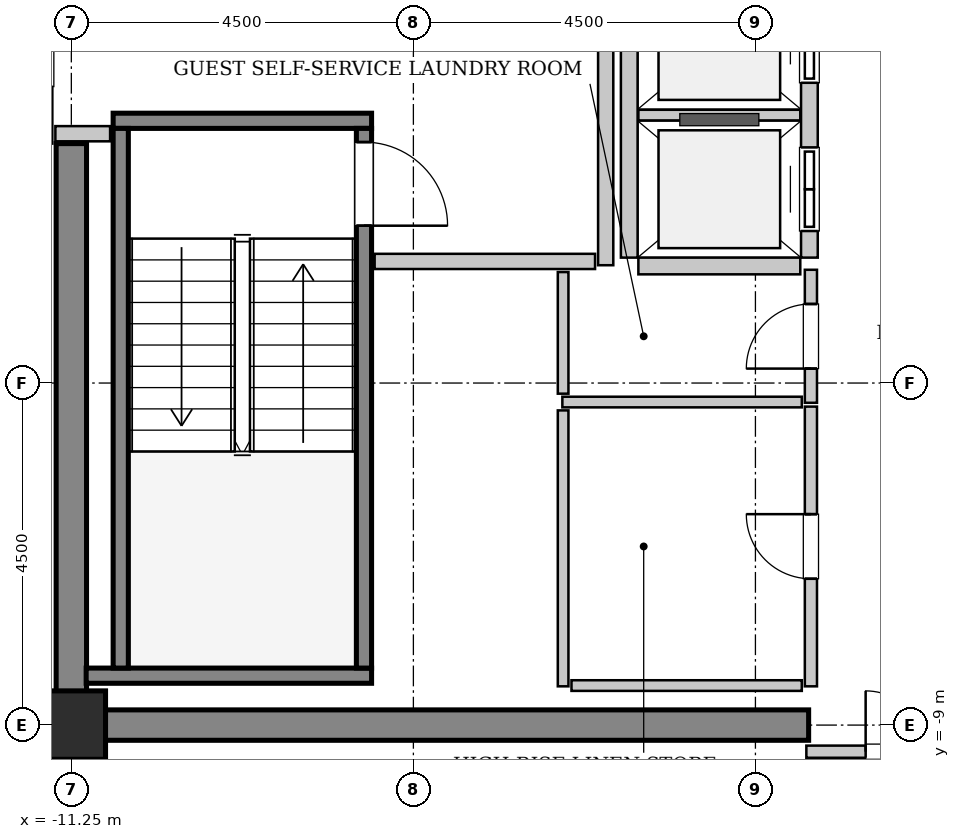
"""IFC4 building model, lengths in metres.
Left out: names, types, materials, properties, quantities, classifications, styles, units other than length and angle.
Written with IfcOpenShell. Run it as: python <this file> out.ifc"""

import sys

from ifc_helpers import new_model, si_unit, direction, frame, frame_2d, origin, origin_2d, place, context, subcontext, project, spatial, rectangle, extrude, source, transform, mapped, element, fill, save


model = new_model("IFC4")
c1 = context("Model", 3, precision=1e-05, world=origin(), true_north=direction((0.0, 1.0)))
c2 = subcontext(c1, "Body", "Model", "MODEL_VIEW")
j1 = project(units=[si_unit("LENGTHUNIT", "METRE"), si_unit("PLANEANGLEUNIT", "RADIAN")], contexts=[c1])
p1 = place(None, origin())
s1 = spatial("IfcSite", under=j1, at=p1, CompositionType="ELEMENT")
p2 = place(p1, origin())
s2 = spatial("IfcBuilding", under=s1, at=p2, CompositionType="ELEMENT")
p3 = place(p2, frame((0.0, 0.0, 333.8)))
s3 = spatial("IfcBuildingStorey", under=s2, at=p3, CompositionType="ELEMENT", Elevation=333.8)
m1 = source(origin(), c2, "Body", "SweptSolid", [
    extrude(rectangle(XDim=9.9, YDim=0.4, at=frame_2d((4.95, 0.0))), origin(), (0.0, 0.0, 1.0), 3.8),
])
p4 = place(p3, frame((-11.45, -9.0, 0.0), z_axis=(0.0, 0.0, 1.0), x_axis=(1.0, 0.0, 0.0)))
e1 = element("IfcWall", 1, at=p4, inside=s3, PredefinedType="SHEAR", context=c2, shape_type="MappedRepresentation", body=[
    mapped(m1, transform((0.0, 0.0, 0.0), x_axis=(1.0, 0.0, 0.0), y_axis=(0.0, 1.0, 0.0), z_axis=(0.0, 0.0, 1.0), scale=1.0)),
])
m2 = source(origin(), c2, "Body", "SweptSolid", [
    extrude(rectangle(XDim=7.45, YDim=0.4, at=frame_2d((3.725, 0.0))), origin(), (0.0, 0.0, 1.0), 3.8),
])
p5 = place(p3, frame((-11.25, -8.8, 0.0), z_axis=(0.0, 0.0, 1.0), x_axis=(0.0, 1.0, 0.0)))
e2 = element("IfcWall", 2, at=p5, inside=s3, PredefinedType="SHEAR", context=c2, shape_type="MappedRepresentation", body=[
    mapped(m2, transform((0.0, 0.0, 0.0), x_axis=(1.0, 0.0, 0.0), y_axis=(0.0, 1.0, 0.0), z_axis=(0.0, 0.0, 1.0), scale=1.0)),
])
m3 = source(origin(), c2, "Body", "SweptSolid", [
    extrude(rectangle(XDim=0.9, YDim=0.9, at=origin_2d()), origin(), (0.0, 0.0, 1.0), 3.8),
])
p6 = place(p3, frame((-11.25, -9.0, 0.0), z_axis=(0.0, 0.0, 1.0), x_axis=(1.0, 0.0, 0.0)))
e3 = element("IfcColumn", 3, at=p6, inside=s3, PredefinedType="COLUMN", context=c2, shape_type="MappedRepresentation", body=[
    mapped(m3, transform((0.0, 0.0, 0.0), x_axis=(1.0, 0.0, 0.0), y_axis=(0.0, 1.0, 0.0), z_axis=(0.0, 0.0, 1.0), scale=1.0)),
])
m4 = source(origin(), c2, "Body", "SweptSolid", [
    extrude(rectangle(XDim=3.4, YDim=0.2, at=frame_2d((1.7, 0.0))), origin(), (0.0, 0.0, 1.0), 3.8),
])
p7 = place(p3, frame((-10.7, -1.05, 0.0), z_axis=(0.0, 0.0, 1.0), x_axis=(1.0, 0.0, 0.0)))
e4 = element("IfcWall", 4, at=p7, inside=s3, PredefinedType="SOLIDWALL", context=c2, shape_type="MappedRepresentation", body=[
    mapped(m4, transform((0.0, 0.0, 0.0), x_axis=(1.0, 0.0, 0.0), y_axis=(0.0, 1.0, 0.0), z_axis=(0.0, 0.0, 1.0), scale=1.0)),
])
m5 = source(origin(), c2, "Body", "SweptSolid", [
    extrude(rectangle(XDim=3.755, YDim=0.2, at=frame_2d((1.877, 0.0))), origin(), (0.0, 0.0, 1.0), 3.8),
])
p8 = place(p3, frame((-11.055, -8.35, 0.0), z_axis=(0.0, 0.0, 1.0), x_axis=(1.0, 0.0, 0.0)))
e5 = element("IfcWall", 5, at=p8, inside=s3, PredefinedType="SOLIDWALL", context=c2, shape_type="MappedRepresentation", body=[
    mapped(m5, transform((0.0, 0.0, 0.0), x_axis=(1.0, 0.0, 0.0), y_axis=(0.0, 1.0, 0.0), z_axis=(0.0, 0.0, 1.0), scale=1.0)),
])
m6 = source(origin(), c2, "Body", "SweptSolid", [
    extrude(rectangle(XDim=7.1, YDim=0.2, at=frame_2d((3.55, 0.0))), origin(), (0.0, 0.0, 1.0), 3.8),
])
p9 = place(p3, frame((-10.6, -1.15, 0.0), z_axis=(0.0, 0.0, 1.0), x_axis=(0.0, -1.0, 0.0)))
e6 = element("IfcWall", 6, at=p9, inside=s3, PredefinedType="SOLIDWALL", context=c2, shape_type="MappedRepresentation", body=[
    mapped(m6, transform((0.0, 0.0, 0.0), x_axis=(1.0, 0.0, 0.0), y_axis=(0.0, 1.0, 0.0), z_axis=(0.0, 0.0, 1.0), scale=1.0)),
])
p10 = place(p3, frame((-7.4, -1.15, 0.0), z_axis=(0.0, 0.0, 1.0), x_axis=(0.0, -1.0, 0.0)))
e7 = element("IfcWall", 7, at=p10, inside=s3, PredefinedType="SOLIDWALL", context=c2, shape_type="MappedRepresentation", body=[
    mapped(m6, transform((0.0, 0.0, 0.0), x_axis=(1.0, 0.0, 0.0), y_axis=(0.0, 1.0, 0.0), z_axis=(0.0, 0.0, 1.0), scale=1.0)),
])
p11 = place(p10, frame((0.18, 0.0, 0.0)))
e8 = element("IfcOpeningElement", 8, at=p11, cuts=e7, PredefinedType="OPENING", context=c2, shape_type="SweptSolid", body=[
    extrude(rectangle(XDim=1.1, YDim=2.15, at=frame_2d((0.55, 1.075))), frame((0.0, 0.11, 0.0), z_axis=(0.0, -1.0, 0.0), x_axis=(1.0, 0.0, 0.0)), (0.0, 0.0, 1.0), 0.22),
])
m7 = source(origin(), c2, "Body", "SweptSolid", [
    extrude(rectangle(XDim=5.7, YDim=0.22, at=frame_2d((2.85, 0.0))), origin(), (0.0, 0.0, 1.0), 3.535),
])
p12 = place(p3, frame((-1.54, -2.85, 0.0), z_axis=(0.0, 0.0, 1.0), x_axis=(0.0, 1.0, 0.0)))
e9 = element("IfcWall", 9, at=p12, inside=s3, PredefinedType="SOLIDWALL", context=c2, shape_type="MappedRepresentation", body=[
    mapped(m7, transform((0.0, 0.0, 0.0), x_axis=(1.0, 0.0, 0.0), y_axis=(0.0, 1.0, 0.0), z_axis=(0.0, 0.0, 1.0), scale=1.0)),
])
p13 = place(p12, frame((0.35, 0.0, 0.0)))
e10 = element("IfcOpeningElement", 10, at=p13, cuts=e9, PredefinedType="OPENING", context=c2, shape_type="SweptSolid", body=[
    extrude(rectangle(XDim=1.1, YDim=2.2, at=frame_2d((0.55, 1.1))), frame((0.0, 0.12, 0.0), z_axis=(0.0, -1.0, 0.0), x_axis=(1.0, 0.0, 0.0)), (0.0, 0.0, 1.0), 0.24),
])
p14 = place(p12, frame((2.3, 0.0, 0.0)))
e11 = element("IfcOpeningElement", 11, at=p14, cuts=e9, PredefinedType="OPENING", context=c2, shape_type="SweptSolid", body=[
    extrude(rectangle(XDim=1.1, YDim=2.2, at=frame_2d((0.55, 1.1))), frame((0.0, 0.12, 0.0), z_axis=(0.0, -1.0, 0.0), x_axis=(1.0, 0.0, 0.0)), (0.0, 0.0, 1.0), 0.24),
])
p15 = place(p12, frame((4.25, 0.0, 0.0)))
e12 = element("IfcOpeningElement", 12, at=p15, cuts=e9, PredefinedType="OPENING", context=c2, shape_type="SweptSolid", body=[
    extrude(rectangle(XDim=1.1, YDim=2.2, at=frame_2d((0.55, 1.1))), frame((0.0, 0.12, 0.0), z_axis=(0.0, -1.0, 0.0), x_axis=(1.0, 0.0, 0.0)), (0.0, 0.0, 1.0), 0.24),
])
p16 = place(p3, frame((-3.91, 2.85, 0.0), z_axis=(0.0, 0.0, 1.0), x_axis=(0.0, -1.0, 0.0)))
e13 = element("IfcWall", 13, at=p16, inside=s3, PredefinedType="SOLIDWALL", context=c2, shape_type="MappedRepresentation", body=[
    mapped(m7, transform((0.0, 0.0, 0.0), x_axis=(1.0, 0.0, 0.0), y_axis=(0.0, 1.0, 0.0), z_axis=(0.0, 0.0, 1.0), scale=1.0)),
])
m8 = source(origin(), c2, "Body", "SweptSolid", [
    extrude(rectangle(XDim=2.13, YDim=0.22, at=frame_2d((1.065, 0.0))), origin(), (0.0, 0.0, 1.0), 3.535),
])
p17 = place(p3, frame((-3.79, -2.96, 0.0), z_axis=(0.0, 0.0, 1.0), x_axis=(1.0, 0.0, 0.0)))
e14 = element("IfcWall", 14, at=p17, inside=s3, PredefinedType="SOLIDWALL", context=c2, shape_type="MappedRepresentation", body=[
    mapped(m8, transform((0.0, 0.0, 0.0), x_axis=(1.0, 0.0, 0.0), y_axis=(0.0, 1.0, 0.0), z_axis=(0.0, 0.0, 1.0), scale=1.0)),
])
m9 = source(origin(), c2, "Body", "SweptSolid", [
    extrude(rectangle(XDim=2.13, YDim=0.14, at=frame_2d((1.065, 0.0))), origin(), (0.0, 0.0, 1.0), 3.535),
])
p18 = place(p3, frame((-3.79, -0.975, 0.0), z_axis=(0.0, 0.0, 1.0), x_axis=(1.0, 0.0, 0.0)))
e15 = element("IfcWall", 15, at=p18, inside=s3, PredefinedType="PARTITIONING", context=c2, shape_type="MappedRepresentation", body=[
    mapped(m9, transform((0.0, 0.0, 0.0), x_axis=(1.0, 0.0, 0.0), y_axis=(0.0, 1.0, 0.0), z_axis=(0.0, 0.0, 1.0), scale=1.0)),
])
m10 = source(origin(), c2, "Body", "SweptSolid", [
    extrude(rectangle(XDim=5.9, YDim=0.2, at=frame_2d((2.95, 0.0))), origin(), (0.0, 0.0, 1.0), 3.535),
])
p19 = place(p3, frame((-4.22, -2.95, 0.0), z_axis=(0.0, 0.0, 1.0), x_axis=(0.0, 1.0, 0.0)))
e16 = element("IfcWall", 16, at=p19, inside=s3, PredefinedType="PARTITIONING", context=c2, shape_type="MappedRepresentation", body=[
    mapped(m10, transform((0.0, 0.0, 0.0), x_axis=(1.0, 0.0, 0.0), y_axis=(0.0, 1.0, 0.0), z_axis=(0.0, 0.0, 1.0), scale=1.0)),
])
m11 = source(origin(), c2, "Body", "SweptSolid", [
    extrude(rectangle(XDim=2.9, YDim=0.2, at=frame_2d((1.45, 0.0))), origin(), (0.0, 0.0, 1.0), 3.535),
])
p20 = place(p3, frame((-7.26, -2.9, 0.0), z_axis=(0.0, 0.0, 1.0), x_axis=(1.0, 0.0, 0.0)))
e17 = element("IfcWall", 17, at=p20, inside=s3, PredefinedType="PARTITIONING", context=c2, shape_type="MappedRepresentation", body=[
    mapped(m11, transform((0.0, 0.0, 0.0), x_axis=(1.0, 0.0, 0.0), y_axis=(0.0, 1.0, 0.0), z_axis=(0.0, 0.0, 1.0), scale=1.0)),
])
m12 = source(origin(), c2, "Body", "SweptSolid", [
    extrude(rectangle(XDim=0.72, YDim=0.2, at=frame_2d((0.36, 0.0))), origin(), (0.0, 0.0, 1.0), 3.535),
])
p21 = place(p3, frame((-11.46, -1.22, 0.0), z_axis=(0.0, 0.0, 1.0), x_axis=(1.0, 0.0, 0.0)))
e18 = element("IfcWall", 18, at=p21, inside=s3, PredefinedType="PARTITIONING", context=c2, shape_type="MappedRepresentation", body=[
    mapped(m12, transform((0.0, 0.0, 0.0), x_axis=(1.0, 0.0, 0.0), y_axis=(0.0, 1.0, 0.0), z_axis=(0.0, 0.0, 1.0), scale=1.0)),
])
m13 = source(origin(), c2, "Body", "SweptSolid", [
    extrude(rectangle(XDim=3.16, YDim=0.16, at=frame_2d((1.58, 0.0))), origin(), (0.0, 0.0, 1.0), 2.625),
])
p22 = place(p3, frame((-1.58, -9.35, 0.0), z_axis=(0.0, 0.0, 1.0), x_axis=(1.0, 0.0, 0.0)))
e19 = element("IfcWall", 19, at=p22, inside=s3, PredefinedType="PARTITIONING", context=c2, shape_type="MappedRepresentation", body=[
    mapped(m13, transform((0.0, 0.0, 0.0), x_axis=(1.0, 0.0, 0.0), y_axis=(0.0, 1.0, 0.0), z_axis=(0.0, 0.0, 1.0), scale=1.0)),
])
p23 = place(p22, frame((0.78, 0.0, 0.0)))
e20 = element("IfcOpeningElement", 20, at=p23, cuts=e19, PredefinedType="OPENING", context=c2, shape_type="SweptSolid", body=[
    extrude(rectangle(XDim=1.6, YDim=2.3, at=frame_2d((0.8, 1.15))), frame((0.0, 0.09, 0.0), z_axis=(0.0, -1.0, 0.0), x_axis=(1.0, 0.0, 0.0)), (0.0, 0.0, 1.0), 0.18),
])
m14 = source(origin(), c2, "Body", "SweptSolid", [
    extrude(rectangle(XDim=1.75, YDim=0.16, at=frame_2d((0.875, 0.0))), origin(), (0.0, 0.0, 1.0), 3.535),
])
p24 = place(p3, frame((-1.52, -4.76, 0.0), z_axis=(0.0, 0.0, 1.0), x_axis=(0.0, 1.0, 0.0)))
e21 = element("IfcWall", 21, at=p24, inside=s3, PredefinedType="PARTITIONING", context=c2, shape_type="MappedRepresentation", body=[
    mapped(m14, transform((0.0, 0.0, 0.0), x_axis=(1.0, 0.0, 0.0), y_axis=(0.0, 1.0, 0.0), z_axis=(0.0, 0.0, 1.0), scale=1.0)),
])
p25 = place(p24, frame((0.45, 0.0, 0.0)))
e22 = element("IfcOpeningElement", 22, at=p25, cuts=e21, PredefinedType="OPENING", context=c2, shape_type="SweptSolid", body=[
    extrude(rectangle(XDim=0.85, YDim=2.1, at=frame_2d((0.425, 1.05))), frame((0.0, 0.09, 0.0), z_axis=(0.0, -1.0, 0.0), x_axis=(1.0, 0.0, 0.0)), (0.0, 0.0, 1.0), 0.18),
])
m15 = source(origin(), c2, "Body", "SweptSolid", [
    extrude(rectangle(XDim=3.15, YDim=0.14, at=frame_2d((1.575, 0.0))), origin(), (0.0, 0.0, 1.0), 3.535),
])
p26 = place(p3, frame((-4.79, -4.75, 0.0), z_axis=(0.0, 0.0, 1.0), x_axis=(1.0, 0.0, 0.0)))
e23 = element("IfcWall", 23, at=p26, inside=s3, PredefinedType="PARTITIONING", context=c2, shape_type="MappedRepresentation", body=[
    mapped(m15, transform((0.0, 0.0, 0.0), x_axis=(1.0, 0.0, 0.0), y_axis=(0.0, 1.0, 0.0), z_axis=(0.0, 0.0, 1.0), scale=1.0)),
])
m16 = source(origin(), c2, "Body", "SweptSolid", [
    extrude(rectangle(XDim=1.6, YDim=0.14, at=frame_2d((0.8, 0.0))), origin(), (0.0, 0.0, 1.0), 3.535),
])
p27 = place(p3, frame((-4.78, -4.64, 0.0), z_axis=(0.0, 0.0, 1.0), x_axis=(0.0, 1.0, 0.0)))
e24 = element("IfcWall", 24, at=p27, inside=s3, PredefinedType="PARTITIONING", context=c2, shape_type="MappedRepresentation", body=[
    mapped(m16, transform((0.0, 0.0, 0.0), x_axis=(1.0, 0.0, 0.0), y_axis=(0.0, 1.0, 0.0), z_axis=(0.0, 0.0, 1.0), scale=1.0)),
])
m17 = source(origin(), c2, "Body", "SweptSolid", [
    extrude(rectangle(XDim=3.68, YDim=0.16, at=frame_2d((1.84, 0.0))), origin(), (0.0, 0.0, 1.0), 3.535),
])
p28 = place(p3, frame((-1.52, -8.49, 0.0), z_axis=(0.0, 0.0, 1.0), x_axis=(0.0, 1.0, 0.0)))
e25 = element("IfcWall", 25, at=p28, inside=s3, PredefinedType="PARTITIONING", context=c2, shape_type="MappedRepresentation", body=[
    mapped(m17, transform((0.0, 0.0, 0.0), x_axis=(1.0, 0.0, 0.0), y_axis=(0.0, 1.0, 0.0), z_axis=(0.0, 0.0, 1.0), scale=1.0)),
])
p29 = place(p28, frame((1.415, 0.0, 0.0)))
e26 = element("IfcOpeningElement", 26, at=p29, cuts=e25, PredefinedType="OPENING", context=c2, shape_type="SweptSolid", body=[
    extrude(rectangle(XDim=0.85, YDim=2.1, at=frame_2d((0.425, 1.05))), frame((0.0, 0.09, 0.0), z_axis=(0.0, -1.0, 0.0), x_axis=(1.0, 0.0, 0.0)), (0.0, 0.0, 1.0), 0.18),
])
m18 = source(origin(), c2, "Body", "SweptSolid", [
    extrude(rectangle(XDim=3.63, YDim=0.14, at=frame_2d((1.815, 0.0))), origin(), (0.0, 0.0, 1.0), 3.535),
])
p30 = place(p3, frame((-4.78, -8.49, 0.0), z_axis=(0.0, 0.0, 1.0), x_axis=(0.0, 1.0, 0.0)))
e27 = element("IfcWall", 27, at=p30, inside=s3, PredefinedType="PARTITIONING", context=c2, shape_type="MappedRepresentation", body=[
    mapped(m18, transform((0.0, 0.0, 0.0), x_axis=(1.0, 0.0, 0.0), y_axis=(0.0, 1.0, 0.0), z_axis=(0.0, 0.0, 1.0), scale=1.0)),
])
m19 = source(origin(), c2, "Body", "SweptSolid", [
    extrude(rectangle(XDim=3.03, YDim=0.14, at=frame_2d((1.515, 0.0))), origin(), (0.0, 0.0, 1.0), 3.535),
])
p31 = place(p3, frame((-4.67, -8.48, 0.0), z_axis=(0.0, 0.0, 1.0), x_axis=(1.0, 0.0, 0.0)))
e28 = element("IfcWall", 28, at=p31, inside=s3, PredefinedType="PARTITIONING", context=c2, shape_type="MappedRepresentation", body=[
    mapped(m19, transform((0.0, 0.0, 0.0), x_axis=(1.0, 0.0, 0.0), y_axis=(0.0, 1.0, 0.0), z_axis=(0.0, 0.0, 1.0), scale=1.0)),
])
m20 = source(origin(), c2, "Body", "SweptSolid", [
    extrude(rectangle(XDim=1.1, YDim=2.15, at=frame_2d((0.55, 1.075))), frame((0.0, 0.025, 0.0), z_axis=(0.0, -1.0, 0.0), x_axis=(1.0, 0.0, 0.0)), (0.0, 0.0, 1.0), 0.05),
])
p32 = place(p11, origin())
e29 = element("IfcDoor", 29, at=p32, inside=s3, OperationType="SINGLE_SWING_RIGHT", PredefinedType="DOOR", context=c2, shape_type="MappedRepresentation", body=[
    mapped(m20, transform((0.0, 0.0, 0.0), x_axis=(1.0, 0.0, 0.0), y_axis=(0.0, 1.0, 0.0), z_axis=(0.0, 0.0, 1.0), scale=1.0)),
])
fill(e8, e29)
m21 = source(origin(), c2, "Body", "SweptSolid", [
    extrude(rectangle(XDim=1.1, YDim=2.2, at=frame_2d((0.55, 1.1))), frame((0.0, 0.025, 0.0), z_axis=(0.0, -1.0, 0.0), x_axis=(1.0, 0.0, 0.0)), (0.0, 0.0, 1.0), 0.05),
])
p33 = place(p13, origin())
e30 = element("IfcDoor", 30, at=p33, inside=s3, OperationType="DOUBLE_DOOR_SLIDING", PredefinedType="DOOR", context=c2, shape_type="MappedRepresentation", body=[
    mapped(m21, transform((0.0, 0.0, 0.0), x_axis=(1.0, 0.0, 0.0), y_axis=(0.0, 1.0, 0.0), z_axis=(0.0, 0.0, 1.0), scale=1.0)),
])
fill(e10, e30)
p34 = place(p14, origin())
e31 = element("IfcDoor", 31, at=p34, inside=s3, OperationType="DOUBLE_DOOR_SLIDING", PredefinedType="DOOR", context=c2, shape_type="MappedRepresentation", body=[
    mapped(m21, transform((0.0, 0.0, 0.0), x_axis=(1.0, 0.0, 0.0), y_axis=(0.0, 1.0, 0.0), z_axis=(0.0, 0.0, 1.0), scale=1.0)),
])
fill(e11, e31)
m22 = source(origin(), c2, "Body", "SweptSolid", [
    extrude(rectangle(XDim=1.6, YDim=2.3, at=frame_2d((0.8, 1.15))), frame((0.0, 0.025, 0.0), z_axis=(0.0, -1.0, 0.0), x_axis=(1.0, 0.0, 0.0)), (0.0, 0.0, 1.0), 0.05),
])
p35 = place(p23, origin())
e32 = element("IfcDoor", 32, at=p35, inside=s3, OperationType="DOUBLE_DOOR_SINGLE_SWING", PredefinedType="DOOR", context=c2, shape_type="MappedRepresentation", body=[
    mapped(m22, transform((0.0, 0.0, 0.0), x_axis=(1.0, 0.0, 0.0), y_axis=(0.0, 1.0, 0.0), z_axis=(0.0, 0.0, 1.0), scale=1.0)),
])
fill(e20, e32)
m23 = source(origin(), c2, "Body", "SweptSolid", [
    extrude(rectangle(XDim=0.85, YDim=2.1, at=frame_2d((0.425, 1.05))), frame((0.0, 0.025, 0.0), z_axis=(0.0, -1.0, 0.0), x_axis=(1.0, 0.0, 0.0)), (0.0, 0.0, 1.0), 0.05),
])
p36 = place(p25, origin())
e33 = element("IfcDoor", 33, at=p36, inside=s3, OperationType="SINGLE_SWING_LEFT", PredefinedType="DOOR", context=c2, shape_type="MappedRepresentation", body=[
    mapped(m23, transform((0.0, 0.0, 0.0), x_axis=(1.0, 0.0, 0.0), y_axis=(0.0, 1.0, 0.0), z_axis=(0.0, 0.0, 1.0), scale=1.0)),
])
fill(e22, e33)
p37 = place(p29, origin())
e34 = element("IfcDoor", 34, at=p37, inside=s3, OperationType="SINGLE_SWING_RIGHT", PredefinedType="DOOR", context=c2, shape_type="MappedRepresentation", body=[
    mapped(m23, transform((0.0, 0.0, 0.0), x_axis=(1.0, 0.0, 0.0), y_axis=(0.0, 1.0, 0.0), z_axis=(0.0, 0.0, 1.0), scale=1.0)),
])
fill(e26, e34)
save(model, sys.argv[1])
